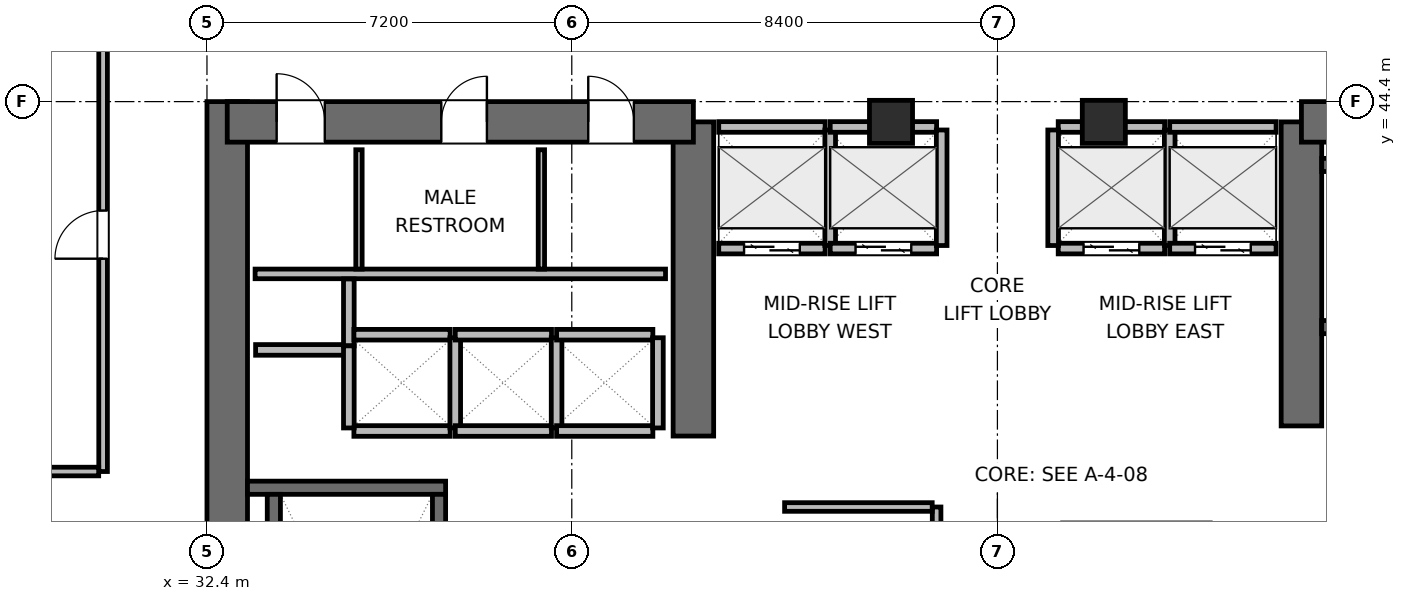
"""IFC4 building model, lengths in metres.
Left out: names, types, materials, properties, quantities, classifications, styles, units other than length and angle.
Written with IfcOpenShell. Run it as: python <this file> out.ifc"""

import sys

from ifc_helpers import new_model, si_unit, direction, frame, frame_2d, origin, origin_2d, place, context, subcontext, project, spatial, rectangle, extrude, element, fill, save


model = new_model("IFC4")
c1 = context("Model", 3, precision=1e-05, world=origin(), true_north=direction((0.0, 1.0)))
c2 = subcontext(c1, "Body", "Model", "MODEL_VIEW")
j1 = project(units=[si_unit("LENGTHUNIT", "METRE"), si_unit("PLANEANGLEUNIT", "RADIAN")], contexts=[c1])
p1 = place(None, origin())
s1 = spatial("IfcSite", under=j1, at=p1, CompositionType="ELEMENT")
p2 = place(p1, origin())
s2 = spatial("IfcBuilding", under=s1, at=p2, CompositionType="ELEMENT")
p3 = place(p2, frame((0.0, 0.0, 141.6)))
s3 = spatial("IfcBuildingStorey", under=s2, at=p3, CompositionType="ELEMENT", Elevation=141.6)
p4 = place(p3, frame((32.8, 27.6, 0.0), z_axis=(0.0, 0.0, 1.0), x_axis=(0.0, 1.0, 0.0)))
e1 = element("IfcWall", 1, at=p4, inside=s3, PredefinedType="SHEAR", context=c2, shape_type="SweptSolid", body=[
    extrude(rectangle(XDim=16.8, YDim=0.8, at=frame_2d((8.4, 0.0))), origin(), (0.0, 0.0, 1.0), 3.9),
])
p5 = place(p3, frame((42.0, 37.8, 0.0), z_axis=(0.0, 0.0, 1.0), x_axis=(0.0, 1.0, 0.0)))
e2 = element("IfcWall", 2, at=p5, inside=s3, PredefinedType="SHEAR", context=c2, shape_type="SweptSolid", body=[
    extrude(rectangle(XDim=6.2, YDim=0.8, at=frame_2d((3.1, 0.0))), origin(), (0.0, 0.0, 1.0), 3.9),
])
p6 = place(p3, frame((32.8, 44.0, 0.0), z_axis=(0.0, 0.0, 1.0), x_axis=(1.0, 0.0, 0.0)))
e3 = element("IfcWall", 3, at=p6, inside=s3, PredefinedType="SHEAR", context=c2, shape_type="SweptSolid", body=[
    extrude(rectangle(XDim=9.2, YDim=0.8, at=frame_2d((4.6, 0.0))), origin(), (0.0, 0.0, 1.0), 3.9),
])
p7 = place(p6, frame((0.975, 0.0, 0.0)))
e4 = element("IfcOpeningElement", 4, at=p7, cuts=e3, PredefinedType="OPENING", context=c2, shape_type="SweptSolid", body=[
    extrude(rectangle(XDim=0.95, YDim=2.04, at=frame_2d((0.475, 1.02))), frame((0.0, 0.41, 0.0), z_axis=(0.0, -1.0, 0.0), x_axis=(1.0, 0.0, 0.0)), (0.0, 0.0, 1.0), 0.82),
])
p8 = place(p6, frame((4.225, 0.0, 0.0)))
e5 = element("IfcOpeningElement", 5, at=p8, cuts=e3, PredefinedType="OPENING", context=c2, shape_type="SweptSolid", body=[
    extrude(rectangle(XDim=0.9, YDim=2.02, at=frame_2d((0.45, 1.01))), frame((0.0, 0.41, 0.0), z_axis=(0.0, -1.0, 0.0), x_axis=(1.0, 0.0, 0.0)), (0.0, 0.0, 1.0), 0.82),
])
p9 = place(p6, frame((7.125, 0.0, 0.0)))
e6 = element("IfcOpeningElement", 6, at=p9, cuts=e3, PredefinedType="OPENING", context=c2, shape_type="SweptSolid", body=[
    extrude(rectangle(XDim=0.9, YDim=2.02, at=frame_2d((0.45, 1.01))), frame((0.0, 0.41, 0.0), z_axis=(0.0, -1.0, 0.0), x_axis=(1.0, 0.0, 0.0)), (0.0, 0.0, 1.0), 0.82),
])
p10 = place(p3, frame((54.0, 38.0, 0.0), z_axis=(0.0, 0.0, 1.0), x_axis=(0.0, 1.0, 0.0)))
e7 = element("IfcWall", 7, at=p10, inside=s3, PredefinedType="SHEAR", context=c2, shape_type="SweptSolid", body=[
    extrude(rectangle(XDim=6.0, YDim=0.8, at=frame_2d((3.0, 0.0))), origin(), (0.0, 0.0, 1.0), 3.9),
])
p11 = place(p3, frame((54.0, 44.0, 0.0), z_axis=(0.0, 0.0, 1.0), x_axis=(1.0, 0.0, 0.0)))
e8 = element("IfcWall", 8, at=p11, inside=s3, PredefinedType="SHEAR", context=c2, shape_type="SweptSolid", body=[
    extrude(rectangle(XDim=9.2, YDim=0.8, at=frame_2d((4.6, 0.0))), origin(), (0.0, 0.0, 1.0), 3.9),
])
p12 = place(p3, frame((33.2, 36.78, 0.0), z_axis=(0.0, 0.0, 1.0), x_axis=(1.0, 0.0, 0.0)))
e9 = element("IfcWall", 9, at=p12, inside=s3, PredefinedType="SHEAR", context=c2, shape_type="SweptSolid", body=[
    extrude(rectangle(XDim=3.91, YDim=0.26, at=frame_2d((1.955, 0.0))), origin(), (0.0, 0.0, 1.0), 3.9),
])
p13 = place(p3, frame((33.72, 29.05, 0.0), z_axis=(0.0, 0.0, 1.0), x_axis=(0.0, 1.0, 0.0)))
e10 = element("IfcWall", 10, at=p13, inside=s3, PredefinedType="SHEAR", context=c2, shape_type="SweptSolid", body=[
    extrude(rectangle(XDim=7.6, YDim=0.26, at=frame_2d((3.8, 0.0))), origin(), (0.0, 0.0, 1.0), 3.9),
])
p14 = place(p3, frame((36.98, 29.05, 0.0), z_axis=(0.0, 0.0, 1.0), x_axis=(0.0, 1.0, 0.0)))
e11 = element("IfcWall", 11, at=p14, inside=s3, PredefinedType="SHEAR", context=c2, shape_type="SweptSolid", body=[
    extrude(rectangle(XDim=7.6, YDim=0.26, at=frame_2d((3.8, 0.0))), origin(), (0.0, 0.0, 1.0), 3.9),
])
p15 = place(p14, frame((0.3, 0.0, 0.0)))
e12 = element("IfcOpeningElement", 12, at=p15, cuts=e11, PredefinedType="OPENING", context=c2, shape_type="SweptSolid", body=[
    extrude(rectangle(XDim=1.0, YDim=2.04, at=frame_2d((0.5, 1.02))), frame((0.0, 0.14, 0.0), z_axis=(0.0, -1.0, 0.0), x_axis=(1.0, 0.0, 0.0)), (0.0, 0.0, 1.0), 0.28),
])
p16 = place(p3, frame((54.4, 39.95, 0.0), z_axis=(0.0, 0.0, 1.0), x_axis=(1.0, 0.0, 0.0)))
e13 = element("IfcWall", 13, at=p16, inside=s3, PredefinedType="SHEAR", context=c2, shape_type="SweptSolid", body=[
    extrude(rectangle(XDim=8.4, YDim=0.26, at=frame_2d((4.2, 0.0))), origin(), (0.0, 0.0, 1.0), 3.9),
])
p17 = place(p16, frame((0.8, 0.0, 0.0)))
e14 = element("IfcOpeningElement", 14, at=p17, cuts=e13, PredefinedType="OPENING", context=c2, shape_type="SweptSolid", body=[
    extrude(rectangle(XDim=1.0, YDim=2.04, at=frame_2d((0.5, 1.02))), frame((0.0, 0.14, 0.0), z_axis=(0.0, -1.0, 0.0), x_axis=(1.0, 0.0, 0.0)), (0.0, 0.0, 1.0), 0.28),
])
p18 = place(p3, frame((54.4, 43.15, 0.0), z_axis=(0.0, 0.0, 1.0), x_axis=(1.0, 0.0, 0.0)))
e15 = element("IfcWall", 15, at=p18, inside=s3, PredefinedType="SHEAR", context=c2, shape_type="SweptSolid", body=[
    extrude(rectangle(XDim=8.4, YDim=0.26, at=frame_2d((4.2, 0.0))), origin(), (0.0, 0.0, 1.0), 3.9),
])
for number, where, z_axis, x_axis in (
    (16, (45.9, 44.0, 0.0), (0.0, 0.0, 1.0), (1.0, 0.0, 0.0)),
    (17, (50.1, 44.0, 0.0), (0.0, 0.0, 1.0), (1.0, 0.0, 0.0)),
):
    element("IfcColumn", number, at=place(p3, frame(where, z_axis=z_axis, x_axis=x_axis)), inside=s3, PredefinedType="COLUMN", context=c2, shape_type="SweptSolid", body=[
        extrude(rectangle(XDim=0.85, YDim=0.85, at=origin_2d()), origin(), (0.0, 0.0, 1.0), 3.9),
    ])
p19 = place(p3, frame((33.35, 41.0, 0.0), z_axis=(0.0, 0.0, 1.0), x_axis=(1.0, 0.0, 0.0)))
e18 = element("IfcWall", 18, at=p19, inside=s3, PredefinedType="PLUMBINGWALL", context=c2, shape_type="SweptSolid", body=[
    extrude(rectangle(XDim=8.1, YDim=0.19, at=frame_2d((4.05, 0.0))), origin(), (0.0, 0.0, 1.0), 3.6),
])
for number, where, z_axis, x_axis in (
    (19, (35.4, 41.095, 0.0), (0.0, 0.0, 1.0), (0.0, 1.0, 0.0)),
    (20, (39.0, 41.095, 0.0), (0.0, 0.0, 1.0), (0.0, 1.0, 0.0)),
):
    element("IfcWall", number, at=place(p3, frame(where, z_axis=z_axis, x_axis=x_axis)), inside=s3, PredefinedType="PARTITIONING", context=c2, shape_type="SweptSolid", body=[
        extrude(rectangle(XDim=2.355, YDim=0.125, at=frame_2d((1.177, 0.0))), origin(), (0.0, 0.0, 1.0), 3.6),
    ])
p20 = place(p3, frame((33.36, 39.5, 0.0), z_axis=(0.0, 0.0, 1.0), x_axis=(1.0, 0.0, 0.0)))
e21 = element("IfcWall", 21, at=p20, inside=s3, PredefinedType="PARTITIONING", context=c2, shape_type="SweptSolid", body=[
    extrude(rectangle(XDim=1.86, YDim=0.21, at=frame_2d((0.93, 0.0))), origin(), (0.0, 0.0, 1.0), 3.6),
])
p21 = place(p3, frame((35.2, 39.58, 0.0), z_axis=(0.0, 0.0, 1.0), x_axis=(0.0, 1.0, 0.0)))
e22 = element("IfcWall", 22, at=p21, inside=s3, PredefinedType="PARTITIONING", context=c2, shape_type="SweptSolid", body=[
    extrude(rectangle(XDim=1.32, YDim=0.21, at=frame_2d((0.66, 0.0))), origin(), (0.0, 0.0, 1.0), 3.6),
])
p22 = place(p3, frame((42.5, 41.5, 0.0), z_axis=(0.0, 0.0, 1.0), x_axis=(1.0, 0.0, 0.0)))
e23 = element("IfcWall", 23, at=p22, inside=s3, PredefinedType="PARTITIONING", context=c2, shape_type="SweptSolid", body=[
    extrude(rectangle(XDim=2.1, YDim=0.21, at=frame_2d((1.05, 0.0))), origin(), (0.0, 0.0, 1.0), 3.6),
])
p23 = place(p22, frame((0.5, 0.0, 0.0)))
e24 = element("IfcOpeningElement", 24, at=p23, cuts=e23, PredefinedType="OPENING", context=c2, shape_type="SweptSolid", body=[
    extrude(rectangle(XDim=1.1, YDim=2.04, at=frame_2d((0.55, 1.02))), frame((0.0, 0.115, 0.0), z_axis=(0.0, -1.0, 0.0), x_axis=(1.0, 0.0, 0.0)), (0.0, 0.0, 1.0), 0.23),
])
p24 = place(p3, frame((42.5, 43.9, 0.0), z_axis=(0.0, 0.0, 1.0), x_axis=(1.0, 0.0, 0.0)))
e25 = element("IfcWall", 25, at=p24, inside=s3, PredefinedType="PARTITIONING", context=c2, shape_type="SweptSolid", body=[
    extrude(rectangle(XDim=2.1, YDim=0.21, at=frame_2d((1.05, 0.0))), origin(), (0.0, 0.0, 1.0), 2.485),
])
p25 = place(p3, frame((44.7, 41.56, 0.0), z_axis=(0.0, 0.0, 1.0), x_axis=(0.0, 1.0, 0.0)))
e26 = element("IfcWall", 26, at=p25, inside=s3, PredefinedType="PARTITIONING", context=c2, shape_type="SweptSolid", body=[
    extrude(rectangle(XDim=2.28, YDim=0.21, at=frame_2d((1.14, 0.0))), origin(), (0.0, 0.0, 1.0), 3.6),
])
p26 = place(p3, frame((44.7, 41.5, 0.0), z_axis=(0.0, 0.0, 1.0), x_axis=(1.0, 0.0, 0.0)))
e27 = element("IfcWall", 27, at=p26, inside=s3, PredefinedType="PARTITIONING", context=c2, shape_type="SweptSolid", body=[
    extrude(rectangle(XDim=2.1, YDim=0.21, at=frame_2d((1.05, 0.0))), origin(), (0.0, 0.0, 1.0), 3.6),
])
p27 = place(p26, frame((0.5, 0.0, 0.0)))
e28 = element("IfcOpeningElement", 28, at=p27, cuts=e27, PredefinedType="OPENING", context=c2, shape_type="SweptSolid", body=[
    extrude(rectangle(XDim=1.1, YDim=2.04, at=frame_2d((0.55, 1.02))), frame((0.0, 0.115, 0.0), z_axis=(0.0, -1.0, 0.0), x_axis=(1.0, 0.0, 0.0)), (0.0, 0.0, 1.0), 0.23),
])
p28 = place(p3, frame((44.7, 43.9, 0.0), z_axis=(0.0, 0.0, 1.0), x_axis=(1.0, 0.0, 0.0)))
e29 = element("IfcWall", 29, at=p28, inside=s3, PredefinedType="PARTITIONING", context=c2, shape_type="SweptSolid", body=[
    extrude(rectangle(XDim=2.1, YDim=0.21, at=frame_2d((1.05, 0.0))), origin(), (0.0, 0.0, 1.0), 2.485),
])
p29 = place(p3, frame((46.9, 41.56, 0.0), z_axis=(0.0, 0.0, 1.0), x_axis=(0.0, 1.0, 0.0)))
e30 = element("IfcWall", 30, at=p29, inside=s3, PredefinedType="PARTITIONING", context=c2, shape_type="SweptSolid", body=[
    extrude(rectangle(XDim=2.28, YDim=0.21, at=frame_2d((1.14, 0.0))), origin(), (0.0, 0.0, 1.0), 3.6),
])
p30 = place(p3, frame((49.2, 41.5, 0.0), z_axis=(0.0, 0.0, 1.0), x_axis=(1.0, 0.0, 0.0)))
e31 = element("IfcWall", 31, at=p30, inside=s3, PredefinedType="PARTITIONING", context=c2, shape_type="SweptSolid", body=[
    extrude(rectangle(XDim=2.1, YDim=0.21, at=frame_2d((1.05, 0.0))), origin(), (0.0, 0.0, 1.0), 3.6),
])
p31 = place(p30, frame((0.5, 0.0, 0.0)))
e32 = element("IfcOpeningElement", 32, at=p31, cuts=e31, PredefinedType="OPENING", context=c2, shape_type="SweptSolid", body=[
    extrude(rectangle(XDim=1.1, YDim=2.04, at=frame_2d((0.55, 1.02))), frame((0.0, 0.115, 0.0), z_axis=(0.0, -1.0, 0.0), x_axis=(1.0, 0.0, 0.0)), (0.0, 0.0, 1.0), 0.23),
])
p32 = place(p3, frame((49.2, 43.9, 0.0), z_axis=(0.0, 0.0, 1.0), x_axis=(1.0, 0.0, 0.0)))
e33 = element("IfcWall", 33, at=p32, inside=s3, PredefinedType="PARTITIONING", context=c2, shape_type="SweptSolid", body=[
    extrude(rectangle(XDim=2.1, YDim=0.21, at=frame_2d((1.05, 0.0))), origin(), (0.0, 0.0, 1.0), 2.485),
])
for number, where, z_axis, x_axis in (
    (34, (49.1, 41.56, 0.0), (0.0, 0.0, 1.0), (0.0, 1.0, 0.0)),
    (35, (51.4, 41.56, 0.0), (0.0, 0.0, 1.0), (0.0, 1.0, 0.0)),
):
    element("IfcWall", number, at=place(p3, frame(where, z_axis=z_axis, x_axis=x_axis)), inside=s3, PredefinedType="PARTITIONING", context=c2, shape_type="SweptSolid", body=[
        extrude(rectangle(XDim=2.28, YDim=0.21, at=frame_2d((1.14, 0.0))), origin(), (0.0, 0.0, 1.0), 3.6),
    ])
p33 = place(p3, frame((51.4, 41.5, 0.0), z_axis=(0.0, 0.0, 1.0), x_axis=(1.0, 0.0, 0.0)))
e36 = element("IfcWall", 36, at=p33, inside=s3, PredefinedType="PARTITIONING", context=c2, shape_type="SweptSolid", body=[
    extrude(rectangle(XDim=2.1, YDim=0.21, at=frame_2d((1.05, 0.0))), origin(), (0.0, 0.0, 1.0), 3.6),
])
p34 = place(p33, frame((0.5, 0.0, 0.0)))
e37 = element("IfcOpeningElement", 37, at=p34, cuts=e36, PredefinedType="OPENING", context=c2, shape_type="SweptSolid", body=[
    extrude(rectangle(XDim=1.1, YDim=2.04, at=frame_2d((0.55, 1.02))), frame((0.0, 0.115, 0.0), z_axis=(0.0, -1.0, 0.0), x_axis=(1.0, 0.0, 0.0)), (0.0, 0.0, 1.0), 0.23),
])
p35 = place(p3, frame((51.4, 43.9, 0.0), z_axis=(0.0, 0.0, 1.0), x_axis=(1.0, 0.0, 0.0)))
e38 = element("IfcWall", 38, at=p35, inside=s3, PredefinedType="PARTITIONING", context=c2, shape_type="SweptSolid", body=[
    extrude(rectangle(XDim=2.1, YDim=0.21, at=frame_2d((1.05, 0.0))), origin(), (0.0, 0.0, 1.0), 2.485),
])
for number, where, z_axis, x_axis in (
    (39, (35.3, 37.9, 0.0), (0.0, 0.0, 1.0), (1.0, 0.0, 0.0)),
    (40, (35.3, 39.8, 0.0), (0.0, 0.0, 1.0), (1.0, 0.0, 0.0)),
):
    element("IfcWall", number, at=place(p3, frame(where, z_axis=z_axis, x_axis=x_axis)), inside=s3, PredefinedType="PARTITIONING", context=c2, shape_type="SweptSolid", body=[
        extrude(rectangle(XDim=1.9, YDim=0.21, at=frame_2d((0.95, 0.0))), origin(), (0.0, 0.0, 1.0), 3.6),
    ])
p36 = place(p3, frame((35.2, 37.96, 0.0), z_axis=(0.0, 0.0, 1.0), x_axis=(0.0, 1.0, 0.0)))
e41 = element("IfcWall", 41, at=p36, inside=s3, PredefinedType="PARTITIONING", context=c2, shape_type="SweptSolid", body=[
    extrude(rectangle(XDim=1.62, YDim=0.21, at=frame_2d((0.81, 0.0))), origin(), (0.0, 0.0, 1.0), 3.6),
])
p37 = place(p3, frame((37.3, 37.96, 0.0), z_axis=(0.0, 0.0, 1.0), x_axis=(0.0, 1.0, 0.0)))
e42 = element("IfcWall", 42, at=p37, inside=s3, PredefinedType="PARTITIONING", context=c2, shape_type="SweptSolid", body=[
    extrude(rectangle(XDim=1.78, YDim=0.21, at=frame_2d((0.89, 0.0))), origin(), (0.0, 0.0, 1.0), 3.6),
])
for number, where, z_axis, x_axis in (
    (43, (37.3, 37.9, 0.0), (0.0, 0.0, 1.0), (1.0, 0.0, 0.0)),
    (44, (37.3, 39.8, 0.0), (0.0, 0.0, 1.0), (1.0, 0.0, 0.0)),
):
    element("IfcWall", number, at=place(p3, frame(where, z_axis=z_axis, x_axis=x_axis)), inside=s3, PredefinedType="PARTITIONING", context=c2, shape_type="SweptSolid", body=[
        extrude(rectangle(XDim=1.9, YDim=0.21, at=frame_2d((0.95, 0.0))), origin(), (0.0, 0.0, 1.0), 3.6),
    ])
p38 = place(p3, frame((39.3, 37.96, 0.0), z_axis=(0.0, 0.0, 1.0), x_axis=(0.0, 1.0, 0.0)))
e45 = element("IfcWall", 45, at=p38, inside=s3, PredefinedType="PARTITIONING", context=c2, shape_type="SweptSolid", body=[
    extrude(rectangle(XDim=1.78, YDim=0.21, at=frame_2d((0.89, 0.0))), origin(), (0.0, 0.0, 1.0), 3.6),
])
for number, where, z_axis, x_axis in (
    (46, (39.3, 37.9, 0.0), (0.0, 0.0, 1.0), (1.0, 0.0, 0.0)),
    (47, (39.3, 39.8, 0.0), (0.0, 0.0, 1.0), (1.0, 0.0, 0.0)),
):
    element("IfcWall", number, at=place(p3, frame(where, z_axis=z_axis, x_axis=x_axis)), inside=s3, PredefinedType="PARTITIONING", context=c2, shape_type="SweptSolid", body=[
        extrude(rectangle(XDim=1.9, YDim=0.21, at=frame_2d((0.95, 0.0))), origin(), (0.0, 0.0, 1.0), 3.6),
    ])
p39 = place(p3, frame((41.3, 37.96, 0.0), z_axis=(0.0, 0.0, 1.0), x_axis=(0.0, 1.0, 0.0)))
e48 = element("IfcWall", 48, at=p39, inside=s3, PredefinedType="PARTITIONING", context=c2, shape_type="SweptSolid", body=[
    extrude(rectangle(XDim=1.78, YDim=0.21, at=frame_2d((0.89, 0.0))), origin(), (0.0, 0.0, 1.0), 3.6),
])
p40 = place(p3, frame((46.8, 32.6, 0.0), z_axis=(0.0, 0.0, 1.0), x_axis=(0.0, 1.0, 0.0)))
e49 = element("IfcWall", 49, at=p40, inside=s3, PredefinedType="PARTITIONING", context=c2, shape_type="SweptSolid", body=[
    extrude(rectangle(XDim=3.8, YDim=0.17, at=frame_2d((1.9, 0.0))), origin(), (0.0, 0.0, 1.0), 3.6),
])
p41 = place(p40, frame((0.5, 0.0, 0.0)))
e50 = element("IfcOpeningElement", 50, at=p41, cuts=e49, PredefinedType="OPENING", context=c2, shape_type="SweptSolid", body=[
    extrude(rectangle(XDim=0.9, YDim=2.02, at=frame_2d((0.45, 1.01))), frame((0.0, 0.095, 0.0), z_axis=(0.0, -1.0, 0.0), x_axis=(1.0, 0.0, 0.0)), (0.0, 0.0, 1.0), 0.19),
])
p42 = place(p40, frame((2.4, 0.0, 0.0)))
e51 = element("IfcOpeningElement", 51, at=p42, cuts=e49, PredefinedType="OPENING", context=c2, shape_type="SweptSolid", body=[
    extrude(rectangle(XDim=0.9, YDim=2.02, at=frame_2d((0.45, 1.01))), frame((0.0, 0.095, 0.0), z_axis=(0.0, -1.0, 0.0), x_axis=(1.0, 0.0, 0.0)), (0.0, 0.0, 1.0), 0.19),
])
p43 = place(p3, frame((43.8, 36.4, 0.0), z_axis=(0.0, 0.0, 1.0), x_axis=(1.0, 0.0, 0.0)))
e52 = element("IfcWall", 52, at=p43, inside=s3, PredefinedType="PARTITIONING", context=c2, shape_type="SweptSolid", body=[
    extrude(rectangle(XDim=2.913, YDim=0.17, at=frame_2d((1.457, 0.0))), origin(), (0.0, 0.0, 1.0), 3.6),
])
p44 = place(p3, frame((30.35, 37.1, 0.0), z_axis=(0.0, 0.0, 1.0), x_axis=(0.0, 1.0, 0.0)))
e53 = element("IfcWall", 53, at=p44, inside=s3, PredefinedType="PARTITIONING", context=c2, shape_type="SweptSolid", body=[
    extrude(rectangle(XDim=9.263, YDim=0.17, at=frame_2d((4.631, 0.0))), origin(), (0.0, 0.0, 1.0), 3.6),
])
p45 = place(p44, frame((4.2, 0.0, 0.0)))
e54 = element("IfcOpeningElement", 54, at=p45, cuts=e53, PredefinedType="OPENING", context=c2, shape_type="SweptSolid", body=[
    extrude(rectangle(XDim=0.95, YDim=2.04, at=frame_2d((0.475, 1.02))), frame((0.0, 0.095, 0.0), z_axis=(0.0, -1.0, 0.0), x_axis=(1.0, 0.0, 0.0)), (0.0, 0.0, 1.0), 0.19),
])
p46 = place(p3, frame((18.245, 37.1, 0.0), z_axis=(0.0, 0.0, 1.0), x_axis=(1.0, 0.0, 0.0)))
e55 = element("IfcWall", 55, at=p46, inside=s3, PredefinedType="PARTITIONING", context=c2, shape_type="SweptSolid", body=[
    extrude(rectangle(XDim=12.018, YDim=0.17, at=frame_2d((6.009, 0.0))), origin(), (0.0, 0.0, 1.0), 3.6),
])
p47 = place(p23, origin())
e56 = element("IfcDoor", 56, at=p47, inside=s3, OperationType="DOUBLE_DOOR_SLIDING", PredefinedType="DOOR", context=c2, shape_type="SweptSolid", body=[
    extrude(rectangle(XDim=1.1, YDim=2.04, at=frame_2d((0.55, 1.02))), frame((0.0, 0.025, 0.0), z_axis=(0.0, -1.0, 0.0), x_axis=(1.0, 0.0, 0.0)), (0.0, 0.0, 1.0), 0.05),
])
fill(e24, e56)
p48 = place(p27, origin())
e57 = element("IfcDoor", 57, at=p48, inside=s3, OperationType="DOUBLE_DOOR_SLIDING", PredefinedType="DOOR", context=c2, shape_type="SweptSolid", body=[
    extrude(rectangle(XDim=1.1, YDim=2.04, at=frame_2d((0.55, 1.02))), frame((0.0, 0.025, 0.0), z_axis=(0.0, -1.0, 0.0), x_axis=(1.0, 0.0, 0.0)), (0.0, 0.0, 1.0), 0.05),
])
fill(e28, e57)
p49 = place(p31, origin())
e58 = element("IfcDoor", 58, at=p49, inside=s3, OperationType="DOUBLE_DOOR_SLIDING", PredefinedType="DOOR", context=c2, shape_type="SweptSolid", body=[
    extrude(rectangle(XDim=1.1, YDim=2.04, at=frame_2d((0.55, 1.02))), frame((0.0, 0.025, 0.0), z_axis=(0.0, -1.0, 0.0), x_axis=(1.0, 0.0, 0.0)), (0.0, 0.0, 1.0), 0.05),
])
fill(e32, e58)
p50 = place(p34, origin())
e59 = element("IfcDoor", 59, at=p50, inside=s3, OperationType="DOUBLE_DOOR_SLIDING", PredefinedType="DOOR", context=c2, shape_type="SweptSolid", body=[
    extrude(rectangle(XDim=1.1, YDim=2.04, at=frame_2d((0.55, 1.02))), frame((0.0, 0.025, 0.0), z_axis=(0.0, -1.0, 0.0), x_axis=(1.0, 0.0, 0.0)), (0.0, 0.0, 1.0), 0.05),
])
fill(e37, e59)
p51 = place(p7, origin())
e60 = element("IfcDoor", 60, at=p51, inside=s3, OperationType="SINGLE_SWING_LEFT", PredefinedType="DOOR", context=c2, shape_type="SweptSolid", body=[
    extrude(rectangle(XDim=0.95, YDim=2.04, at=frame_2d((0.475, 1.02))), frame((0.0, 0.025, 0.0), z_axis=(0.0, -1.0, 0.0), x_axis=(1.0, 0.0, 0.0)), (0.0, 0.0, 1.0), 0.05),
])
fill(e4, e60)
p52 = place(p8, origin())
e61 = element("IfcDoor", 61, at=p52, inside=s3, OperationType="SINGLE_SWING_RIGHT", PredefinedType="DOOR", context=c2, shape_type="SweptSolid", body=[
    extrude(rectangle(XDim=0.9, YDim=2.02, at=frame_2d((0.45, 1.01))), frame((0.0, 0.025, 0.0), z_axis=(0.0, -1.0, 0.0), x_axis=(1.0, 0.0, 0.0)), (0.0, 0.0, 1.0), 0.05),
])
fill(e5, e61)
p53 = place(p9, origin())
e62 = element("IfcDoor", 62, at=p53, inside=s3, OperationType="SINGLE_SWING_LEFT", PredefinedType="DOOR", context=c2, shape_type="SweptSolid", body=[
    extrude(rectangle(XDim=0.9, YDim=2.02, at=frame_2d((0.45, 1.01))), frame((0.0, 0.025, 0.0), z_axis=(0.0, -1.0, 0.0), x_axis=(1.0, 0.0, 0.0)), (0.0, 0.0, 1.0), 0.05),
])
fill(e6, e62)
p54 = place(p45, origin())
e63 = element("IfcDoor", 63, at=p54, inside=s3, OperationType="SINGLE_SWING_LEFT", PredefinedType="DOOR", context=c2, shape_type="SweptSolid", body=[
    extrude(rectangle(XDim=0.95, YDim=2.04, at=frame_2d((0.475, 1.02))), frame((0.0, 0.025, 0.0), z_axis=(0.0, -1.0, 0.0), x_axis=(1.0, 0.0, 0.0)), (0.0, 0.0, 1.0), 0.05),
])
fill(e54, e63)
save(model, sys.argv[1])
